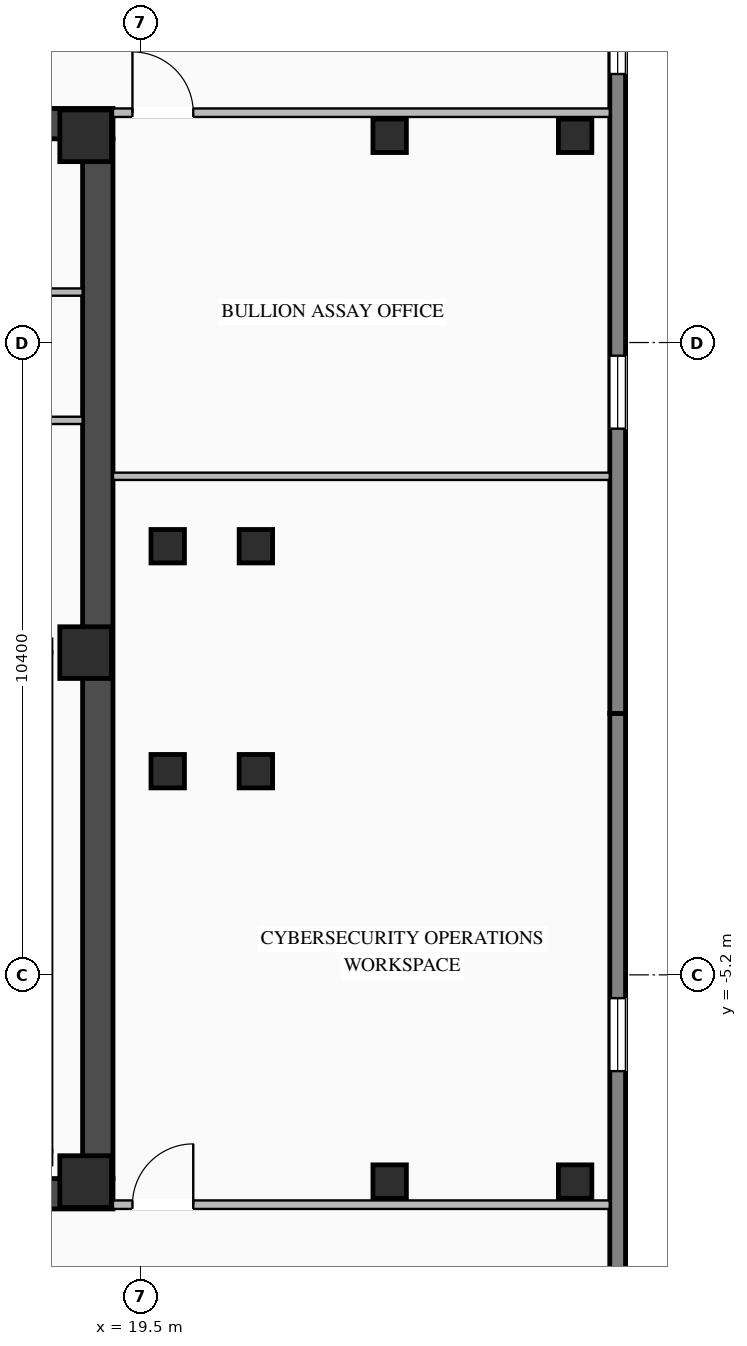
"""IFC4 building model, lengths in metres.
Left out: names, types, materials, properties, quantities, classifications, styles, units other than length and angle.
Written with IfcOpenShell. Run it as: python <this file> out.ifc"""

import sys

from ifc_helpers import new_model, si_unit, direction, frame, frame_2d, origin, origin_2d, place, context, subcontext, project, spatial, rectangle, i_section, extrude, element, fill, save


model = new_model("IFC4")
c1 = context("Model", 3, precision=1e-05, world=origin(), true_north=direction((0.0, 1.0)))
c2 = subcontext(c1, "Body", "Model", "MODEL_VIEW")
j1 = project(units=[si_unit("LENGTHUNIT", "METRE"), si_unit("PLANEANGLEUNIT", "RADIAN")], contexts=[c1])
p1 = place(None, origin())
s1 = spatial("IfcSite", under=j1, at=p1, CompositionType="ELEMENT")
p2 = place(p1, origin())
s2 = spatial("IfcBuilding", under=s1, at=p2, CompositionType="ELEMENT")
p3 = place(p2, frame((0.0, 0.0, 218.85)))
s3 = spatial("IfcBuildingStorey", under=s2, at=p3, CompositionType="ELEMENT", Elevation=218.85)
p4 = place(p3, frame((8.8, -8.8, 0.0), z_axis=(0.0, 0.0, 1.0), x_axis=(1.0, 0.0, 0.0)))
e1 = element("IfcWall", 1, at=p4, inside=s3, PredefinedType="SHEAR", context=c2, shape_type="SweptSolid", body=[
    extrude(rectangle(XDim=10.25, YDim=0.5, at=frame_2d((5.125, 0.0))), origin(), (0.0, 0.0, 1.0), 3.27),
])
p5 = place(p3, frame((8.8, 8.8, 0.0), z_axis=(0.0, 0.0, 1.0), x_axis=(1.0, 0.0, 0.0)))
e2 = element("IfcWall", 2, at=p5, inside=s3, PredefinedType="SHEAR", context=c2, shape_type="SweptSolid", body=[
    extrude(rectangle(XDim=10.25, YDim=0.5, at=frame_2d((5.125, 0.0))), origin(), (0.0, 0.0, 1.0), 3.27),
])
p6 = place(p5, frame((3.25, 0.0, 0.0)))
e3 = element("IfcOpeningElement", 3, at=p6, cuts=e2, PredefinedType="OPENING", context=c2, shape_type="SweptSolid", body=[
    extrude(rectangle(XDim=1.4, YDim=2.05, at=frame_2d((0.7, 1.025))), frame((0.0, 0.26, 0.0), z_axis=(0.0, -1.0, 0.0), x_axis=(1.0, 0.0, 0.0)), (0.0, 0.0, 1.0), 0.52),
])
p7 = place(p3, frame((18.8, -8.55, 0.0), z_axis=(0.0, 0.0, 1.0), x_axis=(0.0, 1.0, 0.0)))
e4 = element("IfcWall", 4, at=p7, inside=s3, PredefinedType="SHEAR", context=c2, shape_type="SweptSolid", body=[
    extrude(rectangle(XDim=17.1, YDim=0.5, at=frame_2d((8.55, 0.0))), origin(), (0.0, 0.0, 1.0), 3.27),
])
for number, where, z_axis, x_axis in (
    (5, (18.6, -8.6, 0.0), (0.0, 0.0, 1.0), (1.0, 0.0, 0.0)),
    (6, (18.6, 0.1, 0.0), (0.0, 0.0, 1.0), (1.0, 0.0, 0.0)),
    (7, (18.6, 8.6, 0.0), (0.0, 0.0, 1.0), (1.0, 0.0, 0.0)),
):
    element("IfcColumn", number, at=place(p3, frame(where, z_axis=z_axis, x_axis=x_axis)), inside=s3, PredefinedType="COLUMN", context=c2, shape_type="SweptSolid", body=[
        extrude(rectangle(XDim=0.85, YDim=0.85, at=origin_2d()), origin(), (0.0, 0.0, 1.0), 3.45),
    ])
for number, where, z_axis, x_axis in (
    (8, (19.95, -1.85, 0.0), (0.0, 0.0, 1.0), (1.0, 0.0, 0.0)),
    (9, (19.95, 1.85, 0.0), (0.0, 0.0, 1.0), (1.0, 0.0, 0.0)),
    (10, (21.4, -1.85, 0.0), (0.0, 0.0, 1.0), (1.0, 0.0, 0.0)),
    (11, (21.4, 1.85, 0.0), (0.0, 0.0, 1.0), (1.0, 0.0, 0.0)),
    (12, (23.6, -8.6, 0.0), (0.0, 0.0, 1.0), (1.0, 0.0, 0.0)),
    (13, (23.6, 8.6, 0.0), (0.0, 0.0, 1.0), (1.0, 0.0, 0.0)),
    (14, (26.65, -8.6, 0.0), (0.0, 0.0, 1.0), (1.0, 0.0, 0.0)),
    (15, (26.65, 8.6, 0.0), (0.0, 0.0, 1.0), (1.0, 0.0, 0.0)),
):
    element("IfcColumn", number, at=place(p3, frame(where, z_axis=z_axis, x_axis=x_axis)), inside=s3, PredefinedType="COLUMN", context=c2, shape_type="SweptSolid", body=[
        extrude(i_section(OverallWidth=0.55, OverallDepth=0.55, WebThickness=0.024, FlangeThickness=0.036, at=origin_2d()), origin(), (0.0, 0.0, 1.0), 3.45),
    ])
p8 = place(p3, frame((27.35, -0.9, 0.0), z_axis=(0.0, 0.0, 1.0), x_axis=(0.0, -1.0, 0.0)))
e16 = element("IfcWall", 16, at=p8, inside=s3, PredefinedType="STANDARD", context=c2, shape_type="SweptSolid", body=[
    extrude(rectangle(XDim=15.85, YDim=0.26, at=frame_2d((7.925, 0.0))), origin(), (0.0, 0.0, 1.0), 3.25),
])
p9 = place(p8, frame((4.683, 0.0, 0.76)))
e17 = element("IfcOpeningElement", 17, at=p9, cuts=e16, PredefinedType="OPENING", context=c2, shape_type="SweptSolid", body=[
    extrude(rectangle(XDim=1.2, YDim=1.95, at=frame_2d((0.6, 0.975))), frame((0.0, 0.14, 0.0), z_axis=(0.0, -1.0, 0.0), x_axis=(1.0, 0.0, 0.0)), (0.0, 0.0, 1.0), 0.28),
])
p10 = place(p8, frame((10.517, 0.0, 0.76)))
e18 = element("IfcOpeningElement", 18, at=p10, cuts=e16, PredefinedType="OPENING", context=c2, shape_type="SweptSolid", body=[
    extrude(rectangle(XDim=1.2, YDim=1.95, at=frame_2d((0.6, 0.975))), frame((0.0, 0.14, 0.0), z_axis=(0.0, -1.0, 0.0), x_axis=(1.0, 0.0, 0.0)), (0.0, 0.0, 1.0), 0.28),
])
p11 = place(p3, frame((27.35, 14.95, 0.0), z_axis=(0.0, 0.0, 1.0), x_axis=(0.0, -1.0, 0.0)))
e19 = element("IfcWall", 19, at=p11, inside=s3, PredefinedType="STANDARD", context=c2, shape_type="SweptSolid", body=[
    extrude(rectangle(XDim=15.85, YDim=0.26, at=frame_2d((7.925, 0.0))), origin(), (0.0, 0.0, 1.0), 3.25),
])
p12 = place(p11, frame((4.133, 0.0, 0.76)))
e20 = element("IfcOpeningElement", 20, at=p12, cuts=e19, PredefinedType="OPENING", context=c2, shape_type="SweptSolid", body=[
    extrude(rectangle(XDim=1.2, YDim=1.95, at=frame_2d((0.6, 0.975))), frame((0.0, 0.14, 0.0), z_axis=(0.0, -1.0, 0.0), x_axis=(1.0, 0.0, 0.0)), (0.0, 0.0, 1.0), 0.28),
])
p13 = place(p11, frame((9.967, 0.0, 0.76)))
e21 = element("IfcOpeningElement", 21, at=p13, cuts=e19, PredefinedType="OPENING", context=c2, shape_type="SweptSolid", body=[
    extrude(rectangle(XDim=1.2, YDim=1.95, at=frame_2d((0.6, 0.975))), frame((0.0, 0.14, 0.0), z_axis=(0.0, -1.0, 0.0), x_axis=(1.0, 0.0, 0.0)), (0.0, 0.0, 1.0), 0.28),
])
p14 = place(p3, frame((13.9, 3.92, 0.0), z_axis=(0.0, 0.0, 1.0), x_axis=(1.0, 0.0, 0.0)))
e22 = element("IfcWall", 22, at=p14, inside=s3, PredefinedType="STANDARD", context=c2, shape_type="SweptSolid", body=[
    extrude(rectangle(XDim=4.65, YDim=0.12, at=frame_2d((2.325, 0.0))), origin(), (0.0, 0.0, 1.0), 3.25),
])
p15 = place(p3, frame((16.15, 6.03, 0.0), z_axis=(0.0, 0.0, 1.0), x_axis=(1.0, 0.0, 0.0)))
e23 = element("IfcWall", 23, at=p15, inside=s3, PredefinedType="STANDARD", context=c2, shape_type="SweptSolid", body=[
    extrude(rectangle(XDim=2.4, YDim=0.12, at=frame_2d((1.2, 0.0))), origin(), (0.0, 0.0, 1.0), 3.25),
])
p16 = place(p3, frame((19.05, 8.98, 0.0), z_axis=(0.0, 0.0, 1.0), x_axis=(1.0, 0.0, 0.0)))
e24 = element("IfcWall", 24, at=p16, inside=s3, PredefinedType="STANDARD", context=c2, shape_type="SweptSolid", body=[
    extrude(rectangle(XDim=8.17, YDim=0.14, at=frame_2d((4.085, 0.0))), origin(), (0.0, 0.0, 1.0), 3.25),
])
p17 = place(p16, frame((0.32, 0.0, 0.0)))
e25 = element("IfcOpeningElement", 25, at=p17, cuts=e24, PredefinedType="OPENING", context=c2, shape_type="SweptSolid", body=[
    extrude(rectangle(XDim=1.0, YDim=2.08, at=frame_2d((0.5, 1.04))), frame((0.0, 0.08, 0.0), z_axis=(0.0, -1.0, 0.0), x_axis=(1.0, 0.0, 0.0)), (0.0, 0.0, 1.0), 0.16),
])
p18 = place(p3, frame((19.05, -8.98, 0.0), z_axis=(0.0, 0.0, 1.0), x_axis=(1.0, 0.0, 0.0)))
e26 = element("IfcWall", 26, at=p18, inside=s3, PredefinedType="STANDARD", context=c2, shape_type="SweptSolid", body=[
    extrude(rectangle(XDim=8.17, YDim=0.14, at=frame_2d((4.085, 0.0))), origin(), (0.0, 0.0, 1.0), 3.25),
])
p19 = place(p18, frame((0.32, 0.0, 0.0)))
e27 = element("IfcOpeningElement", 27, at=p19, cuts=e26, PredefinedType="OPENING", context=c2, shape_type="SweptSolid", body=[
    extrude(rectangle(XDim=1.0, YDim=2.08, at=frame_2d((0.5, 1.04))), frame((0.0, 0.08, 0.0), z_axis=(0.0, -1.0, 0.0), x_axis=(1.0, 0.0, 0.0)), (0.0, 0.0, 1.0), 0.16),
])
p20 = place(p3, frame((19.05, 3.0, 0.0), z_axis=(0.0, 0.0, 1.0), x_axis=(1.0, 0.0, 0.0)))
e28 = element("IfcWall", 28, at=p20, inside=s3, PredefinedType="STANDARD", context=c2, shape_type="SweptSolid", body=[
    extrude(rectangle(XDim=8.17, YDim=0.12, at=frame_2d((4.085, 0.0))), origin(), (0.0, 0.0, 1.0), 3.25),
])
p21 = place(p9, origin())
e29 = element("IfcWindow", 29, at=p21, inside=s3, PartitioningType="SINGLE_PANEL", PredefinedType="WINDOW", context=c2, shape_type="SweptSolid", body=[
    extrude(rectangle(XDim=1.2, YDim=1.95, at=frame_2d((0.6, 0.975))), frame((0.0, 0.03, 0.0), z_axis=(0.0, -1.0, 0.0), x_axis=(1.0, 0.0, 0.0)), (0.0, 0.0, 1.0), 0.06),
])
fill(e17, e29)
p22 = place(p12, origin())
e30 = element("IfcWindow", 30, at=p22, inside=s3, PartitioningType="SINGLE_PANEL", PredefinedType="WINDOW", context=c2, shape_type="SweptSolid", body=[
    extrude(rectangle(XDim=1.2, YDim=1.95, at=frame_2d((0.6, 0.975))), frame((0.0, 0.03, 0.0), z_axis=(0.0, -1.0, 0.0), x_axis=(1.0, 0.0, 0.0)), (0.0, 0.0, 1.0), 0.06),
])
fill(e20, e30)
p23 = place(p13, origin())
e31 = element("IfcWindow", 31, at=p23, inside=s3, PartitioningType="SINGLE_PANEL", PredefinedType="WINDOW", context=c2, shape_type="SweptSolid", body=[
    extrude(rectangle(XDim=1.2, YDim=1.95, at=frame_2d((0.6, 0.975))), frame((0.0, 0.03, 0.0), z_axis=(0.0, -1.0, 0.0), x_axis=(1.0, 0.0, 0.0)), (0.0, 0.0, 1.0), 0.06),
])
fill(e21, e31)
p24 = place(p17, origin())
e32 = element("IfcDoor", 32, at=p24, inside=s3, OperationType="SINGLE_SWING_LEFT", PredefinedType="DOOR", context=c2, shape_type="SweptSolid", body=[
    extrude(rectangle(XDim=1.0, YDim=2.08, at=frame_2d((0.5, 1.04))), frame((0.0, 0.025, 0.0), z_axis=(0.0, -1.0, 0.0), x_axis=(1.0, 0.0, 0.0)), (0.0, 0.0, 1.0), 0.05),
])
fill(e25, e32)
p25 = place(p19, origin())
e33 = element("IfcDoor", 33, at=p25, inside=s3, OperationType="SINGLE_SWING_RIGHT", PredefinedType="DOOR", context=c2, shape_type="SweptSolid", body=[
    extrude(rectangle(XDim=1.0, YDim=2.08, at=frame_2d((0.5, 1.04))), frame((0.0, 0.025, 0.0), z_axis=(0.0, -1.0, 0.0), x_axis=(1.0, 0.0, 0.0)), (0.0, 0.0, 1.0), 0.05),
])
fill(e27, e33)
save(model, sys.argv[1])
